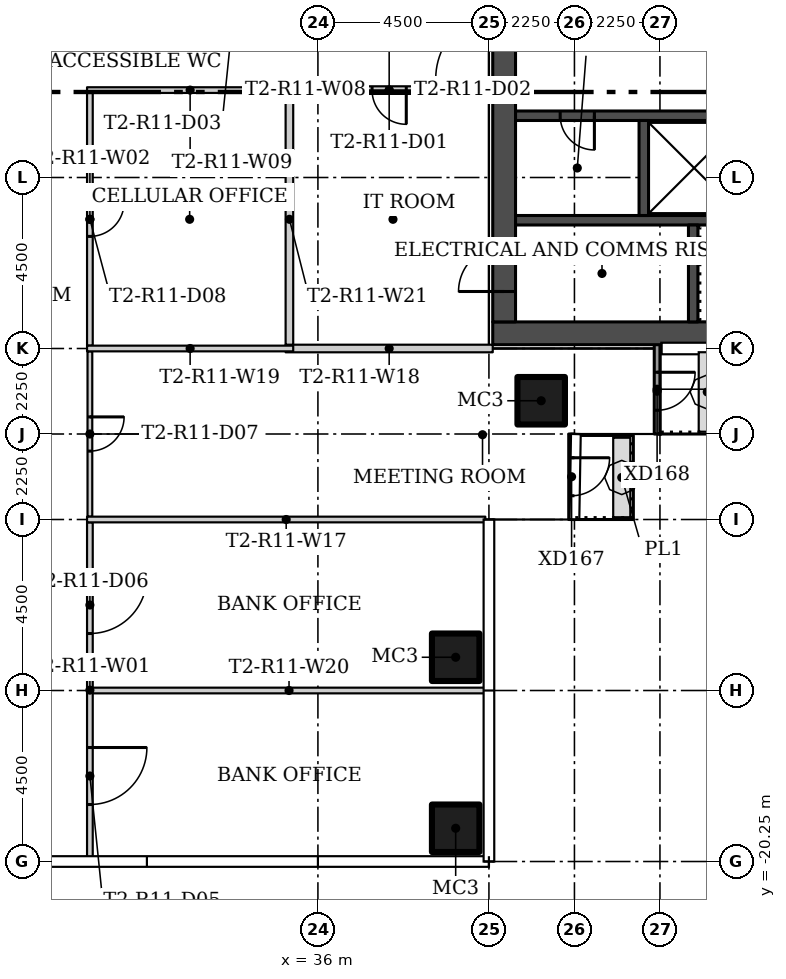
"""IFC4 building model, lengths in metres.
Left out: names, types, materials, properties, quantities, classifications, styles, units other than length and angle.
Written with IfcOpenShell. Run it as: python <this file> out.ifc"""

import sys

from ifc_helpers import new_model, si_unit, direction, frame, frame_2d, origin, origin_2d, place, context, subcontext, project, spatial, rectangle, hollow_rectangle, extrude, element, fill, save


model = new_model("IFC4")
c1 = context("Model", 3, precision=1e-05, world=origin(), true_north=direction((0.0, 1.0)))
c2 = subcontext(c1, "Body", "Model", "MODEL_VIEW")
j1 = project(units=[si_unit("LENGTHUNIT", "METRE"), si_unit("PLANEANGLEUNIT", "RADIAN")], contexts=[c1])
p1 = place(None, origin())
s1 = spatial("IfcSite", under=j1, at=p1, CompositionType="ELEMENT")
p2 = place(p1, origin())
s2 = spatial("IfcBuilding", under=s1, at=p2, CompositionType="ELEMENT")
p3 = place(p2, frame((0.0, 0.0, 109.2)))
s3 = spatial("IfcBuildingStorey", under=s2, at=p3, CompositionType="ELEMENT", Elevation=109.2)
for number, where in (
    (1, (41.875, -8.125, 0.0)),
    (2, (39.625, -14.875, 0.0)),
    (3, (39.625, -19.375, 0.0)),
):
    element("IfcColumn", number, at=place(p3, frame(where)), inside=s3, PredefinedType="COLUMN", context=c2, shape_type="SweptSolid", body=[
        extrude(hollow_rectangle(XDim=1.25, YDim=1.25, WallThickness=0.05, at=origin_2d()), origin(), (0.0, 0.0, 1.0), 3.55),
    ])
p4 = place(p3, frame((30.0, -11.325, 0.0), z_axis=(0.0, 0.0, 1.0), x_axis=(0.0, -1.0, 0.0)))
e4 = element("IfcWall", 4, at=p4, inside=s3, PredefinedType="PARTITIONING", context=c2, shape_type="SweptSolid", body=[
    extrude(rectangle(XDim=8.83, YDim=0.15, at=frame_2d((4.415, 0.0))), origin(), (0.0, 0.0, 1.0), 3.55),
])
p5 = place(p4, frame((5.925, 0.0, 0.0)))
e5 = element("IfcOpeningElement", 5, at=p5, cuts=e4, PredefinedType="OPENING", context=c2, shape_type="SweptSolid", body=[
    extrude(rectangle(XDim=1.5, YDim=2.1, at=frame_2d((0.75, 1.05))), frame((0.0, 0.085, 0.0), z_axis=(0.0, -1.0, 0.0), x_axis=(1.0, 0.0, 0.0)), (0.0, 0.0, 1.0), 0.17),
])
p6 = place(p4, frame((1.425, 0.0, 0.0)))
e6 = element("IfcOpeningElement", 6, at=p6, cuts=e4, PredefinedType="OPENING", context=c2, shape_type="SweptSolid", body=[
    extrude(rectangle(XDim=1.5, YDim=2.1, at=frame_2d((0.75, 1.05))), frame((0.0, 0.085, 0.0), z_axis=(0.0, -1.0, 0.0), x_axis=(1.0, 0.0, 0.0)), (0.0, 0.0, 1.0), 0.17),
])
p7 = place(p3, frame((30.0, -0.025, 0.0), z_axis=(0.0, 0.0, 1.0), x_axis=(0.0, -1.0, 0.0)))
e7 = element("IfcWall", 7, at=p7, inside=s3, PredefinedType="PARTITIONING", context=c2, shape_type="SweptSolid", body=[
    extrude(rectangle(XDim=6.65, YDim=0.15, at=frame_2d((3.325, 0.0))), origin(), (0.0, 0.0, 1.0), 3.55),
])
p8 = place(p7, frame((2.875, 0.0, 0.0)))
e8 = element("IfcOpeningElement", 8, at=p8, cuts=e7, PredefinedType="OPENING", context=c2, shape_type="SweptSolid", body=[
    extrude(rectangle(XDim=0.9, YDim=2.1, at=frame_2d((0.45, 1.05))), frame((0.0, 0.085, 0.0), z_axis=(0.0, -1.0, 0.0), x_axis=(1.0, 0.0, 0.0)), (0.0, 0.0, 1.0), 0.17),
])
p9 = place(p3, frame((30.0, -6.825, 0.0), z_axis=(0.0, 0.0, 1.0), x_axis=(0.0, -1.0, 0.0)))
e9 = element("IfcWall", 9, at=p9, inside=s3, PredefinedType="PARTITIONING", context=c2, shape_type="SweptSolid", body=[
    extrude(rectangle(XDim=4.35, YDim=0.125, at=frame_2d((2.175, 0.0))), origin(), (0.0, 0.0, 1.0), 3.55),
])
p10 = place(p9, frame((1.725, 0.0, 0.0)))
e10 = element("IfcOpeningElement", 10, at=p10, cuts=e9, PredefinedType="OPENING", context=c2, shape_type="SweptSolid", body=[
    extrude(rectangle(XDim=0.9, YDim=2.1, at=frame_2d((0.45, 1.05))), frame((0.0, 0.073, 0.0), z_axis=(0.0, -1.0, 0.0), x_axis=(1.0, 0.0, 0.0)), (0.0, 0.0, 1.0), 0.145),
])
p11 = place(p3, frame((40.6, 0.05, 0.0), z_axis=(0.0, 0.0, 1.0), x_axis=(-1.0, 0.0, 0.0)))
e11 = element("IfcWall", 11, at=p11, inside=s3, PredefinedType="PARTITIONING", context=c2, shape_type="SweptSolid", body=[
    extrude(rectangle(XDim=5.45, YDim=0.2, at=frame_2d((2.725, 0.0))), origin(), (0.0, 0.0, 1.0), 3.55),
])
p12 = place(p11, frame((2.275, 0.0, 0.0)))
e12 = element("IfcOpeningElement", 12, at=p12, cuts=e11, PredefinedType="OPENING", context=c2, shape_type="SweptSolid", body=[
    extrude(rectangle(XDim=0.9, YDim=2.1, at=frame_2d((0.45, 1.05))), frame((0.0, 0.11, 0.0), z_axis=(0.0, -1.0, 0.0), x_axis=(1.0, 0.0, 0.0)), (0.0, 0.0, 1.0), 0.22),
])
p13 = place(p3, frame((35.35, 0.05, 0.0), z_axis=(0.0, 0.0, 1.0), x_axis=(-1.0, 0.0, 0.0)))
e13 = element("IfcWall", 13, at=p13, inside=s3, PredefinedType="PARTITIONING", context=c2, shape_type="SweptSolid", body=[
    extrude(rectangle(XDim=5.425, YDim=0.15, at=frame_2d((2.712, 0.0))), origin(), (0.0, 0.0, 1.0), 3.55),
])
p14 = place(p3, frame((29.925, -11.25, 0.0)))
e14 = element("IfcWall", 14, at=p14, inside=s3, PredefinedType="PARTITIONING", context=c2, shape_type="SweptSolid", body=[
    extrude(rectangle(XDim=10.48, YDim=0.15, at=frame_2d((5.24, 0.0))), origin(), (0.0, 0.0, 1.0), 3.55),
])
p15 = place(p3, frame((40.6, -6.75, 0.0), z_axis=(0.0, 0.0, 1.0), x_axis=(-1.0, 0.0, 0.0)))
e15 = element("IfcWall", 15, at=p15, inside=s3, PredefinedType="PARTITIONING", context=c2, shape_type="SweptSolid", body=[
    extrude(rectangle(XDim=5.45, YDim=0.2, at=frame_2d((2.725, 0.0))), origin(), (0.0, 0.0, 1.0), 3.55),
])
p16 = place(p3, frame((35.35, -6.75, 0.0), z_axis=(0.0, 0.0, 1.0), x_axis=(-1.0, 0.0, 0.0)))
e16 = element("IfcWall", 16, at=p16, inside=s3, PredefinedType="PARTITIONING", context=c2, shape_type="SweptSolid", body=[
    extrude(rectangle(XDim=5.425, YDim=0.15, at=frame_2d((2.712, 0.0))), origin(), (0.0, 0.0, 1.0), 3.55),
])
p17 = place(p3, frame((30.075, -15.75, 0.0)))
e17 = element("IfcWall", 17, at=p17, inside=s3, PredefinedType="PARTITIONING", context=c2, shape_type="SweptSolid", body=[
    extrude(rectangle(XDim=10.33, YDim=0.15, at=frame_2d((5.165, 0.0))), origin(), (0.0, 0.0, 1.0), 3.55),
])
p18 = place(p3, frame((35.25, -0.05, 0.0), z_axis=(0.0, 0.0, 1.0), x_axis=(0.0, -1.0, 0.0)))
e18 = element("IfcWall", 18, at=p18, inside=s3, PredefinedType="PARTITIONING", context=c2, shape_type="SweptSolid", body=[
    extrude(rectangle(XDim=6.6, YDim=0.2, at=frame_2d((3.3, 0.0))), origin(), (0.0, 0.0, 1.0), 3.55),
])
p19 = place(p3, frame((42.675, -9.0, 0.0), z_axis=(0.0, 0.0, 1.0), x_axis=(0.0, -1.0, 0.0)))
e19 = element("IfcWall", 19, at=p19, inside=s3, PredefinedType="SOLIDWALL", context=c2, shape_type="SweptSolid", body=[
    extrude(rectangle(XDim=2.25, YDim=0.15, at=frame_2d((1.125, 0.0))), origin(), (0.0, 0.0, 1.0), 3.45),
])
p20 = place(p19, frame((0.625, 0.0, 0.0)))
e20 = element("IfcOpeningElement", 20, at=p20, cuts=e19, PredefinedType="OPENING", context=c2, shape_type="SweptSolid", body=[
    extrude(rectangle(XDim=1.0, YDim=2.4, at=frame_2d((0.5, 1.2))), frame((0.0, 0.085, 0.0), z_axis=(0.0, -1.0, 0.0), x_axis=(1.0, 0.0, 0.0)), (0.0, 0.0, 1.0), 0.17),
])
p21 = place(p3, frame((44.925, -6.643, 0.0), z_axis=(0.0, 0.0, 1.0), x_axis=(0.0, -1.0, 0.0)))
e21 = element("IfcWall", 21, at=p21, inside=s3, PredefinedType="SOLIDWALL", context=c2, shape_type="SweptSolid", body=[
    extrude(rectangle(XDim=2.357, YDim=0.15, at=frame_2d((1.178, 0.0))), origin(), (0.0, 0.0, 1.0), 3.45),
])
p22 = place(p21, frame((0.732, 0.0, 0.0)))
e22 = element("IfcOpeningElement", 22, at=p22, cuts=e21, PredefinedType="OPENING", context=c2, shape_type="SweptSolid", body=[
    extrude(rectangle(XDim=1.0, YDim=2.4, at=frame_2d((0.5, 1.2))), frame((0.0, 0.085, 0.0), z_axis=(0.0, -1.0, 0.0), x_axis=(1.0, 0.0, 0.0)), (0.0, 0.0, 1.0), 0.17),
])
p23 = place(p3, frame((53.9, -6.35, 0.0), z_axis=(0.0, 0.0, 1.0), x_axis=(-1.0, 0.0, 0.0)))
e23 = element("IfcWall", 23, at=p23, inside=s3, PredefinedType="SHEAR", context=c2, shape_type="SweptSolid", body=[
    extrude(rectangle(XDim=13.3, YDim=0.6, at=frame_2d((6.65, 0.0))), origin(), (0.0, 0.0, 1.0), 3.55),
])
p24 = place(p3, frame((40.9, -6.05, 0.0), z_axis=(0.0, 0.0, 1.0), x_axis=(0.0, 1.0, 0.0)))
e24 = element("IfcWall", 24, at=p24, inside=s3, PredefinedType="SHEAR", context=c2, shape_type="SweptSolid", body=[
    extrude(rectangle(XDim=12.1, YDim=0.6, at=frame_2d((6.05, 0.0))), origin(), (0.0, 0.0, 1.0), 3.55),
])
p25 = place(p24, frame((0.8, 0.0, 0.0)))
e25 = element("IfcOpeningElement", 25, at=p25, cuts=e24, PredefinedType="OPENING", context=c2, shape_type="SweptSolid", body=[
    extrude(rectangle(XDim=1.2, YDim=2.1, at=frame_2d((0.6, 1.05))), frame((0.0, 0.31, 0.0), z_axis=(0.0, -1.0, 0.0), x_axis=(1.0, 0.0, 0.0)), (0.0, 0.0, 1.0), 0.62),
])
p26 = place(p24, frame((6.4, 0.0, 0.0)))
e26 = element("IfcOpeningElement", 26, at=p26, cuts=e24, PredefinedType="OPENING", context=c2, shape_type="SweptSolid", body=[
    extrude(rectangle(XDim=1.8, YDim=2.4, at=frame_2d((0.9, 1.2))), frame((0.0, 0.31, 0.0), z_axis=(0.0, -1.0, 0.0), x_axis=(1.0, 0.0, 0.0)), (0.0, 0.0, 1.0), 0.62),
])
p27 = place(p3, frame((53.3, -3.375, 0.0), z_axis=(0.0, 0.0, 1.0), x_axis=(-1.0, 0.0, 0.0)))
e27 = element("IfcWall", 27, at=p27, inside=s3, PredefinedType="SHEAR", context=c2, shape_type="SweptSolid", body=[
    extrude(rectangle(XDim=12.1, YDim=0.25, at=frame_2d((6.05, 0.0))), origin(), (0.0, 0.0, 1.0), 3.55),
])
p28 = place(p27, frame((0.05, 0.0, 0.0)))
e28 = element("IfcOpeningElement", 28, at=p28, cuts=e27, PredefinedType="OPENING", context=c2, shape_type="SweptSolid", body=[
    extrude(rectangle(XDim=1.1, YDim=2.1, at=frame_2d((0.55, 1.05))), frame((0.0, 0.135, 0.0), z_axis=(0.0, -1.0, 0.0), x_axis=(1.0, 0.0, 0.0)), (0.0, 0.0, 1.0), 0.27),
])
p29 = place(p3, frame((45.875, -6.05, 0.0), z_axis=(0.0, 0.0, 1.0), x_axis=(0.0, 1.0, 0.0)))
e29 = element("IfcWall", 29, at=p29, inside=s3, PredefinedType="SHEAR", context=c2, shape_type="SweptSolid", body=[
    extrude(rectangle(XDim=2.55, YDim=0.25, at=frame_2d((1.275, 0.0))), origin(), (0.0, 0.0, 1.0), 3.55),
])
p30 = place(p3, frame((53.3, -0.625, 0.0), z_axis=(0.0, 0.0, 1.0), x_axis=(-1.0, 0.0, 0.0)))
e30 = element("IfcWall", 30, at=p30, inside=s3, PredefinedType="SHEAR", context=c2, shape_type="SweptSolid", body=[
    extrude(rectangle(XDim=12.1, YDim=0.25, at=frame_2d((6.05, 0.0))), origin(), (0.0, 0.0, 1.0), 3.55),
])
p31 = place(p30, frame((2.25, 0.0, 0.0)))
e31 = element("IfcOpeningElement", 31, at=p31, cuts=e30, PredefinedType="OPENING", context=c2, shape_type="SweptSolid", body=[
    extrude(rectangle(XDim=1.2, YDim=2.1, at=frame_2d((0.6, 1.05))), frame((0.0, 0.135, 0.0), z_axis=(0.0, -1.0, 0.0), x_axis=(1.0, 0.0, 0.0)), (0.0, 0.0, 1.0), 0.27),
])
p32 = place(p30, frame((10.025, 0.0, 0.0)))
e32 = element("IfcOpeningElement", 32, at=p32, cuts=e30, PredefinedType="OPENING", context=c2, shape_type="SweptSolid", body=[
    extrude(rectangle(XDim=0.9, YDim=2.1, at=frame_2d((0.45, 1.05))), frame((0.0, 0.135, 0.0), z_axis=(0.0, -1.0, 0.0), x_axis=(1.0, 0.0, 0.0)), (0.0, 0.0, 1.0), 0.27),
])
p33 = place(p3, frame((44.575, -3.25, 0.0), z_axis=(0.0, 0.0, 1.0), x_axis=(0.0, 1.0, 0.0)))
e33 = element("IfcWall", 33, at=p33, inside=s3, PredefinedType="SHEAR", context=c2, shape_type="SweptSolid", body=[
    extrude(rectangle(XDim=2.5, YDim=0.25, at=frame_2d((1.25, 0.0))), origin(), (0.0, 0.0, 1.0), 3.55),
])
p34 = place(p12, origin())
e34 = element("IfcDoor", 34, at=p34, inside=s3, OperationType="SINGLE_SWING_LEFT", PredefinedType="DOOR", context=c2, shape_type="SweptSolid", body=[
    extrude(rectangle(XDim=0.9, YDim=2.1, at=frame_2d((0.45, 1.05))), frame((0.0, 0.025, 0.0), z_axis=(0.0, -1.0, 0.0), x_axis=(1.0, 0.0, 0.0)), (0.0, 0.0, 1.0), 0.05),
])
fill(e12, e34)
p35 = place(p5, origin())
e35 = element("IfcDoor", 35, at=p35, inside=s3, OperationType="DOUBLE_DOOR_SINGLE_SWING", PredefinedType="DOOR", context=c2, shape_type="SweptSolid", body=[
    extrude(rectangle(XDim=1.5, YDim=2.1, at=frame_2d((0.75, 1.05))), frame((0.0, 0.025, 0.0), z_axis=(0.0, -1.0, 0.0), x_axis=(1.0, 0.0, 0.0)), (0.0, 0.0, 1.0), 0.05),
])
fill(e5, e35)
p36 = place(p6, origin())
e36 = element("IfcDoor", 36, at=p36, inside=s3, OperationType="DOUBLE_DOOR_SINGLE_SWING", PredefinedType="DOOR", context=c2, shape_type="SweptSolid", body=[
    extrude(rectangle(XDim=1.5, YDim=2.1, at=frame_2d((0.75, 1.05))), frame((0.0, 0.025, 0.0), z_axis=(0.0, -1.0, 0.0), x_axis=(1.0, 0.0, 0.0)), (0.0, 0.0, 1.0), 0.05),
])
fill(e6, e36)
p37 = place(p10, origin())
e37 = element("IfcDoor", 37, at=p37, inside=s3, OperationType="SINGLE_SWING_RIGHT", PredefinedType="DOOR", context=c2, shape_type="SweptSolid", body=[
    extrude(rectangle(XDim=0.9, YDim=2.1, at=frame_2d((0.45, 1.05))), frame((0.0, 0.025, 0.0), z_axis=(0.0, -1.0, 0.0), x_axis=(1.0, 0.0, 0.0)), (0.0, 0.0, 1.0), 0.05),
])
fill(e10, e37)
p38 = place(p8, origin())
e38 = element("IfcDoor", 38, at=p38, inside=s3, OperationType="SINGLE_SWING_RIGHT", PredefinedType="DOOR", context=c2, shape_type="SweptSolid", body=[
    extrude(rectangle(XDim=0.9, YDim=2.1, at=frame_2d((0.45, 1.05))), frame((0.0, 0.025, 0.0), z_axis=(0.0, -1.0, 0.0), x_axis=(1.0, 0.0, 0.0)), (0.0, 0.0, 1.0), 0.05),
])
fill(e8, e38)
p39 = place(p20, origin())
e39 = element("IfcDoor", 39, at=p39, inside=s3, OperationType="SINGLE_SWING_LEFT", PredefinedType="DOOR", context=c2, shape_type="SweptSolid", body=[
    extrude(rectangle(XDim=1.0, YDim=2.4, at=frame_2d((0.5, 1.2))), frame((0.0, 0.025, 0.0), z_axis=(0.0, -1.0, 0.0), x_axis=(1.0, 0.0, 0.0)), (0.0, 0.0, 1.0), 0.05),
])
fill(e20, e39)
p40 = place(p22, origin())
e40 = element("IfcDoor", 40, at=p40, inside=s3, OperationType="SINGLE_SWING_RIGHT", PredefinedType="DOOR", context=c2, shape_type="SweptSolid", body=[
    extrude(rectangle(XDim=1.0, YDim=2.4, at=frame_2d((0.5, 1.2))), frame((0.0, 0.025, 0.0), z_axis=(0.0, -1.0, 0.0), x_axis=(1.0, 0.0, 0.0)), (0.0, 0.0, 1.0), 0.05),
])
fill(e22, e40)
p41 = place(p25, origin())
e41 = element("IfcDoor", 41, at=p41, inside=s3, OperationType="SINGLE_SWING_LEFT", PredefinedType="DOOR", context=c2, shape_type="SweptSolid", body=[
    extrude(rectangle(XDim=1.2, YDim=2.1, at=frame_2d((0.6, 1.05))), frame((0.0, 0.025, 0.0), z_axis=(0.0, -1.0, 0.0), x_axis=(1.0, 0.0, 0.0)), (0.0, 0.0, 1.0), 0.05),
])
fill(e25, e41)
p42 = place(p26, origin())
e42 = element("IfcDoor", 42, at=p42, inside=s3, OperationType="DOUBLE_DOOR_SINGLE_SWING", PredefinedType="DOOR", context=c2, shape_type="SweptSolid", body=[
    extrude(rectangle(XDim=1.8, YDim=2.4, at=frame_2d((0.9, 1.2))), frame((0.0, 0.025, 0.0), z_axis=(0.0, -1.0, 0.0), x_axis=(1.0, 0.0, 0.0)), (0.0, 0.0, 1.0), 0.05),
])
fill(e26, e42)
p43 = place(p32, origin())
e43 = element("IfcDoor", 43, at=p43, inside=s3, OperationType="SINGLE_SWING_RIGHT", PredefinedType="DOOR", context=c2, shape_type="SweptSolid", body=[
    extrude(rectangle(XDim=0.9, YDim=2.1, at=frame_2d((0.45, 1.05))), frame((0.0, 0.025, 0.0), z_axis=(0.0, -1.0, 0.0), x_axis=(1.0, 0.0, 0.0)), (0.0, 0.0, 1.0), 0.05),
])
fill(e32, e43)
save(model, sys.argv[1])
